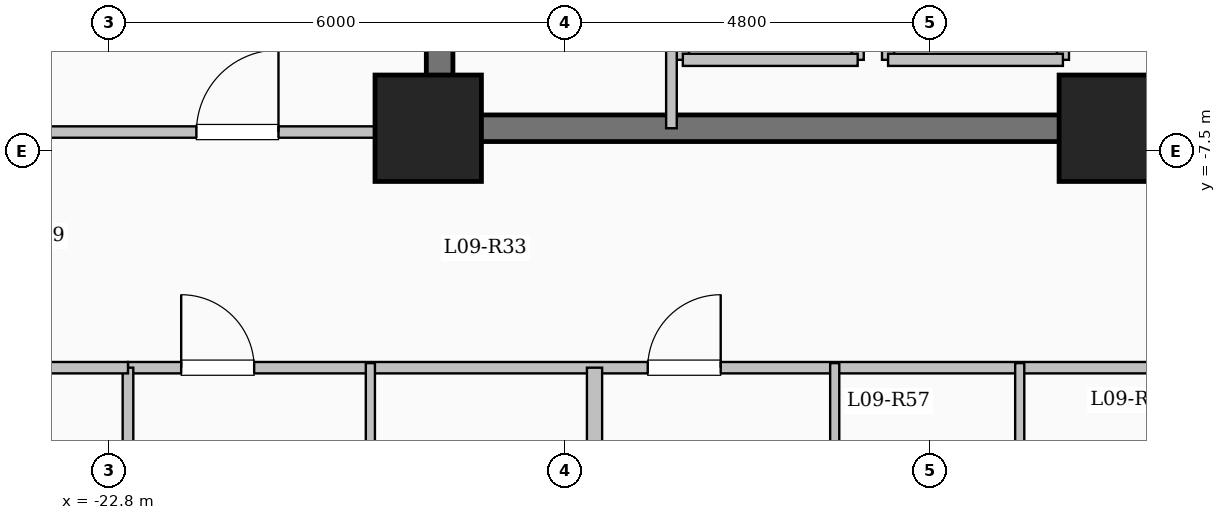
"""IFC4 building model, lengths in metres.
Left out: names, types, materials, properties, quantities, classifications, styles, units other than length and angle.
Written with IfcOpenShell. Run it as: python <this file> out.ifc"""

import sys

from ifc_helpers import new_model, si_unit, direction, frame, frame_2d, origin, origin_2d, place, context, subcontext, project, spatial, rectangle, extrude, element, fill, save


model = new_model("IFC4")
c1 = context("Model", 3, precision=1e-05, world=origin(), true_north=direction((0.0, 1.0)))
c2 = subcontext(c1, "Body", "Model", "MODEL_VIEW")
j1 = project(units=[si_unit("LENGTHUNIT", "METRE"), si_unit("PLANEANGLEUNIT", "RADIAN")], contexts=[c1])
p1 = place(None, origin())
s1 = spatial("IfcSite", under=j1, at=p1, CompositionType="ELEMENT")
p2 = place(p1, origin())
s2 = spatial("IfcBuilding", under=s1, at=p2, CompositionType="ELEMENT")
p3 = place(p2, frame((0.0, 0.0, 37.4)))
s3 = spatial("IfcBuildingStorey", under=s2, at=p3, CompositionType="ELEMENT", Elevation=37.4)
for number, where, z_axis, x_axis in (
    (1, (-9.6, -7.2, 0.0), (0.0, 0.0, 1.0), (1.0, 0.0, 0.0)),
    (2, (-18.6, -7.2, 0.0), (0.0, 0.0, 1.0), (1.0, 0.0, 0.0)),
):
    element("IfcColumn", number, at=place(p3, frame(where, z_axis=z_axis, x_axis=x_axis)), inside=s3, PredefinedType="COLUMN", context=c2, shape_type="SweptSolid", body=[
        extrude(rectangle(XDim=1.4, YDim=1.4, at=origin_2d()), origin(), (0.0, 0.0, 1.0), 3.35),
    ])
p4 = place(p3, frame((-12.55, -6.3, 0.0), z_axis=(0.0, 0.0, 1.0), x_axis=(0.0, 1.0, 0.0)))
e3 = element("IfcWall", 3, at=p4, inside=s3, PredefinedType="SOLIDWALL", context=c2, shape_type="SweptSolid", body=[
    extrude(rectangle(XDim=2.6, YDim=0.16, at=frame_2d((1.3, 0.0))), origin(), (0.0, 0.0, 1.0), 3.1),
])
p5 = place(p3, frame((-10.25, -6.3, 0.0), z_axis=(0.0, 0.0, 1.0), x_axis=(0.0, 1.0, 0.0)))
e4 = element("IfcWall", 4, at=p5, inside=s3, PredefinedType="SOLIDWALL", context=c2, shape_type="SweptSolid", body=[
    extrude(rectangle(XDim=2.6, YDim=0.16, at=frame_2d((1.3, 0.0))), origin(), (0.0, 0.0, 1.0), 3.1),
])
p6 = place(p5, frame((0.75, 0.0, 0.0)))
e5 = element("IfcOpeningElement", 5, at=p6, cuts=e4, PredefinedType="OPENING", context=c2, shape_type="SweptSolid", body=[
    extrude(rectangle(XDim=1.1, YDim=2.15, at=frame_2d((0.55, 1.075))), frame((0.0, 0.09, 0.0), z_axis=(0.0, -1.0, 0.0), x_axis=(1.0, 0.0, 0.0)), (0.0, 0.0, 1.0), 0.18),
])
p7 = place(p3, frame((-12.55, -6.3, 0.0), z_axis=(0.0, 0.0, 1.0), x_axis=(1.0, 0.0, 0.0)))
e6 = element("IfcWall", 6, at=p7, inside=s3, PredefinedType="SOLIDWALL", context=c2, shape_type="SweptSolid", body=[
    extrude(rectangle(XDim=2.3, YDim=0.16, at=frame_2d((1.15, 0.0))), origin(), (0.0, 0.0, 1.0), 3.1),
])
for number, where, z_axis, x_axis in (
    (7, (-15.25, -6.3, 0.0), (0.0, 0.0, 1.0), (0.0, 1.0, 0.0)),
    (8, (-12.95, -6.3, 0.0), (0.0, 0.0, 1.0), (0.0, 1.0, 0.0)),
):
    element("IfcWall", number, at=place(p3, frame(where, z_axis=z_axis, x_axis=x_axis)), inside=s3, PredefinedType="SOLIDWALL", context=c2, shape_type="SweptSolid", body=[
        extrude(rectangle(XDim=2.6, YDim=0.16, at=frame_2d((1.3, 0.0))), origin(), (0.0, 0.0, 1.0), 3.1),
    ])
p8 = place(p3, frame((-15.25, -6.3, 0.0), z_axis=(0.0, 0.0, 1.0), x_axis=(1.0, 0.0, 0.0)))
e9 = element("IfcWall", 9, at=p8, inside=s3, PredefinedType="SOLIDWALL", context=c2, shape_type="SweptSolid", body=[
    extrude(rectangle(XDim=2.3, YDim=0.16, at=frame_2d((1.15, 0.0))), origin(), (0.0, 0.0, 1.0), 3.1),
])
p9 = place(p3, frame((-18.45, -7.375, 0.0), z_axis=(0.0, 0.0, 1.0), x_axis=(0.0, 1.0, 0.0)))
e10 = element("IfcWall", 10, at=p9, inside=s3, PredefinedType="SHEAR", context=c2, shape_type="SweptSolid", body=[
    extrude(rectangle(XDim=14.05, YDim=0.35, at=frame_2d((7.025, 0.0))), origin(), (0.0, 0.0, 1.0), 3.35),
])
p10 = place(p3, frame((-18.625, -7.2, 0.0), z_axis=(0.0, 0.0, 1.0), x_axis=(1.0, 0.0, 0.0)))
e11 = element("IfcWall", 11, at=p10, inside=s3, PredefinedType="SHEAR", context=c2, shape_type="SweptSolid", body=[
    extrude(rectangle(XDim=8.55, YDim=0.35, at=frame_2d((4.275, 0.0))), origin(), (0.0, 0.0, 1.0), 3.35),
])
p11 = place(p3, frame((-15.4, -7.2, 0.0), z_axis=(0.0, 0.0, 1.0), x_axis=(0.0, 1.0, 0.0)))
e12 = element("IfcWall", 12, at=p11, inside=s3, PredefinedType="PARTITIONING", context=c2, shape_type="SweptSolid", body=[
    extrude(rectangle(XDim=10.45, YDim=0.14, at=frame_2d((5.225, 0.0))), origin(), (0.0, 0.0, 1.0), 3.1),
])
p12 = place(p11, frame((9.25, 0.0, 0.0)))
e13 = element("IfcOpeningElement", 13, at=p12, cuts=e12, PredefinedType="OPENING", context=c2, shape_type="SweptSolid", body=[
    extrude(rectangle(XDim=0.9, YDim=2.08, at=frame_2d((0.45, 1.04))), frame((0.0, 0.08, 0.0), z_axis=(0.0, -1.0, 0.0), x_axis=(1.0, 0.0, 0.0)), (0.0, 0.0, 1.0), 0.16),
])
p13 = place(p3, frame((-22.55, -10.35, 0.0), z_axis=(0.0, 0.0, 1.0), x_axis=(1.0, 0.0, 0.0)))
e14 = element("IfcWall", 14, at=p13, inside=s3, PredefinedType="PARTITIONING", context=c2, shape_type="SweptSolid", body=[
    extrude(rectangle(XDim=14.0, YDim=0.15, at=frame_2d((7.0, 0.0))), origin(), (0.0, 0.0, 1.0), 3.1),
])
p14 = place(p13, frame((0.7, 0.0, 0.0)))
e15 = element("IfcOpeningElement", 15, at=p14, cuts=e14, PredefinedType="OPENING", context=c2, shape_type="SweptSolid", body=[
    extrude(rectangle(XDim=0.96, YDim=2.15, at=frame_2d((0.48, 1.075))), frame((0.0, 0.085, 0.0), z_axis=(0.0, -1.0, 0.0), x_axis=(1.0, 0.0, 0.0)), (0.0, 0.0, 1.0), 0.17),
])
p15 = place(p13, frame((6.838, 0.0, 0.0)))
e16 = element("IfcOpeningElement", 16, at=p15, cuts=e14, PredefinedType="OPENING", context=c2, shape_type="SweptSolid", body=[
    extrude(rectangle(XDim=0.96, YDim=2.15, at=frame_2d((0.48, 1.075))), frame((0.0, 0.085, 0.0), z_axis=(0.0, -1.0, 0.0), x_axis=(1.0, 0.0, 0.0)), (0.0, 0.0, 1.0), 0.17),
])
p16 = place(p3, frame((-16.412, -23.6, 0.0), z_axis=(0.0, 0.0, 1.0), x_axis=(0.0, 1.0, 0.0)))
e17 = element("IfcWall", 17, at=p16, inside=s3, PredefinedType="SOLIDWALL", context=c2, shape_type="SweptSolid", body=[
    extrude(rectangle(XDim=13.25, YDim=0.2, at=frame_2d((6.625, 0.0))), origin(), (0.0, 0.0, 1.0), 3.1),
])
p17 = place(p3, frame((-19.361, -13.51, 0.0), z_axis=(0.0, 0.0, 1.0), x_axis=(0.0, 1.0, 0.0)))
e18 = element("IfcWall", 18, at=p17, inside=s3, PredefinedType="PARTITIONING", context=c2, shape_type="SweptSolid", body=[
    extrude(rectangle(XDim=3.22, YDim=0.12, at=frame_2d((1.61, 0.0))), origin(), (0.0, 0.0, 1.0), 3.1),
])
p18 = place(p17, frame((1.14, 0.0, 0.0)))
e19 = element("IfcOpeningElement", 19, at=p18, cuts=e18, PredefinedType="OPENING", context=c2, shape_type="SweptSolid", body=[
    extrude(rectangle(XDim=0.88, YDim=2.1, at=frame_2d((0.44, 1.05))), frame((0.0, 0.07, 0.0), z_axis=(0.0, -1.0, 0.0), x_axis=(1.0, 0.0, 0.0)), (0.0, 0.0, 1.0), 0.14),
])
p19 = place(p3, frame((-13.252, -23.6, 0.0), z_axis=(0.0, 0.0, 1.0), x_axis=(0.0, 1.0, 0.0)))
e20 = element("IfcWall", 20, at=p19, inside=s3, PredefinedType="PARTITIONING", context=c2, shape_type="SweptSolid", body=[
    extrude(rectangle(XDim=13.31, YDim=0.12, at=frame_2d((6.655, 0.0))), origin(), (0.0, 0.0, 1.0), 3.1),
])
p20 = place(p19, frame((9.485, 0.0, 0.0)))
e21 = element("IfcOpeningElement", 21, at=p20, cuts=e20, PredefinedType="OPENING", context=c2, shape_type="SweptSolid", body=[
    extrude(rectangle(XDim=1.08, YDim=2.15, at=frame_2d((0.54, 1.075))), frame((0.0, 0.07, 0.0), z_axis=(0.0, -1.0, 0.0), x_axis=(1.0, 0.0, 0.0)), (0.0, 0.0, 1.0), 0.14),
])
p21 = place(p3, frame((-10.818, -12.75, 0.0), z_axis=(0.0, 0.0, 1.0), x_axis=(0.0, 1.0, 0.0)))
e22 = element("IfcWall", 22, at=p21, inside=s3, PredefinedType="PARTITIONING", context=c2, shape_type="SweptSolid", body=[
    extrude(rectangle(XDim=2.46, YDim=0.12, at=frame_2d((1.23, 0.0))), origin(), (0.0, 0.0, 1.0), 3.1),
])
p22 = place(p3, frame((-28.68, -7.25, 0.0), z_axis=(0.0, 0.0, 1.0), x_axis=(1.0, 0.0, 0.0)))
e23 = element("IfcWall", 23, at=p22, inside=s3, PredefinedType="PARTITIONING", context=c2, shape_type="SweptSolid", body=[
    extrude(rectangle(XDim=10.23, YDim=0.15, at=frame_2d((5.115, 0.0))), origin(), (0.0, 0.0, 1.0), 3.1),
])
p23 = place(p22, frame((7.03, 0.0, 0.0)))
e24 = element("IfcOpeningElement", 24, at=p23, cuts=e23, PredefinedType="OPENING", context=c2, shape_type="SweptSolid", body=[
    extrude(rectangle(XDim=1.08, YDim=2.15, at=frame_2d((0.54, 1.075))), frame((0.0, 0.085, 0.0), z_axis=(0.0, -1.0, 0.0), x_axis=(1.0, 0.0, 0.0)), (0.0, 0.0, 1.0), 0.17),
])
p24 = place(p3, frame((-22.55, -19.05, 0.0), z_axis=(0.0, 0.0, 1.0), x_axis=(0.0, 1.0, 0.0)))
e25 = element("IfcWall", 25, at=p24, inside=s3, PredefinedType="PARTITIONING", context=c2, shape_type="SweptSolid", body=[
    extrude(rectangle(XDim=8.7, YDim=0.14, at=frame_2d((4.35, 0.0))), origin(), (0.0, 0.0, 1.0), 3.1),
])
p25 = place(p3, frame((-28.68, -10.35, 0.0), z_axis=(0.0, 0.0, 1.0), x_axis=(1.0, 0.0, 0.0)))
e26 = element("IfcWall", 26, at=p25, inside=s3, PredefinedType="PARTITIONING", context=c2, shape_type="SweptSolid", body=[
    extrude(rectangle(XDim=6.13, YDim=0.15, at=frame_2d((3.065, 0.0))), origin(), (0.0, 0.0, 1.0), 3.1),
])
p26 = place(p25, frame((2.59, 0.0, 0.0)))
e27 = element("IfcOpeningElement", 27, at=p26, cuts=e26, PredefinedType="OPENING", context=c2, shape_type="SweptSolid", body=[
    extrude(rectangle(XDim=0.95, YDim=2.15, at=frame_2d((0.475, 1.075))), frame((0.0, 0.085, 0.0), z_axis=(0.0, -1.0, 0.0), x_axis=(1.0, 0.0, 0.0)), (0.0, 0.0, 1.0), 0.17),
])
p27 = place(p14, origin())
e28 = element("IfcDoor", 28, at=p27, inside=s3, OperationType="SINGLE_SWING_LEFT", PredefinedType="DOOR", context=c2, shape_type="SweptSolid", body=[
    extrude(rectangle(XDim=0.96, YDim=2.15, at=frame_2d((0.48, 1.075))), frame((0.0, 0.025, 0.0), z_axis=(0.0, -1.0, 0.0), x_axis=(1.0, 0.0, 0.0)), (0.0, 0.0, 1.0), 0.05),
])
fill(e15, e28)
p28 = place(p15, origin())
e29 = element("IfcDoor", 29, at=p28, inside=s3, OperationType="SINGLE_SWING_RIGHT", PredefinedType="DOOR", context=c2, shape_type="SweptSolid", body=[
    extrude(rectangle(XDim=0.96, YDim=2.15, at=frame_2d((0.48, 1.075))), frame((0.0, 0.025, 0.0), z_axis=(0.0, -1.0, 0.0), x_axis=(1.0, 0.0, 0.0)), (0.0, 0.0, 1.0), 0.05),
])
fill(e16, e29)
p29 = place(p23, origin())
e30 = element("IfcDoor", 30, at=p29, inside=s3, OperationType="SINGLE_SWING_RIGHT", PredefinedType="DOOR", context=c2, shape_type="SweptSolid", body=[
    extrude(rectangle(XDim=1.08, YDim=2.15, at=frame_2d((0.54, 1.075))), frame((0.0, 0.025, 0.0), z_axis=(0.0, -1.0, 0.0), x_axis=(1.0, 0.0, 0.0)), (0.0, 0.0, 1.0), 0.05),
])
fill(e24, e30)
save(model, sys.argv[1])
